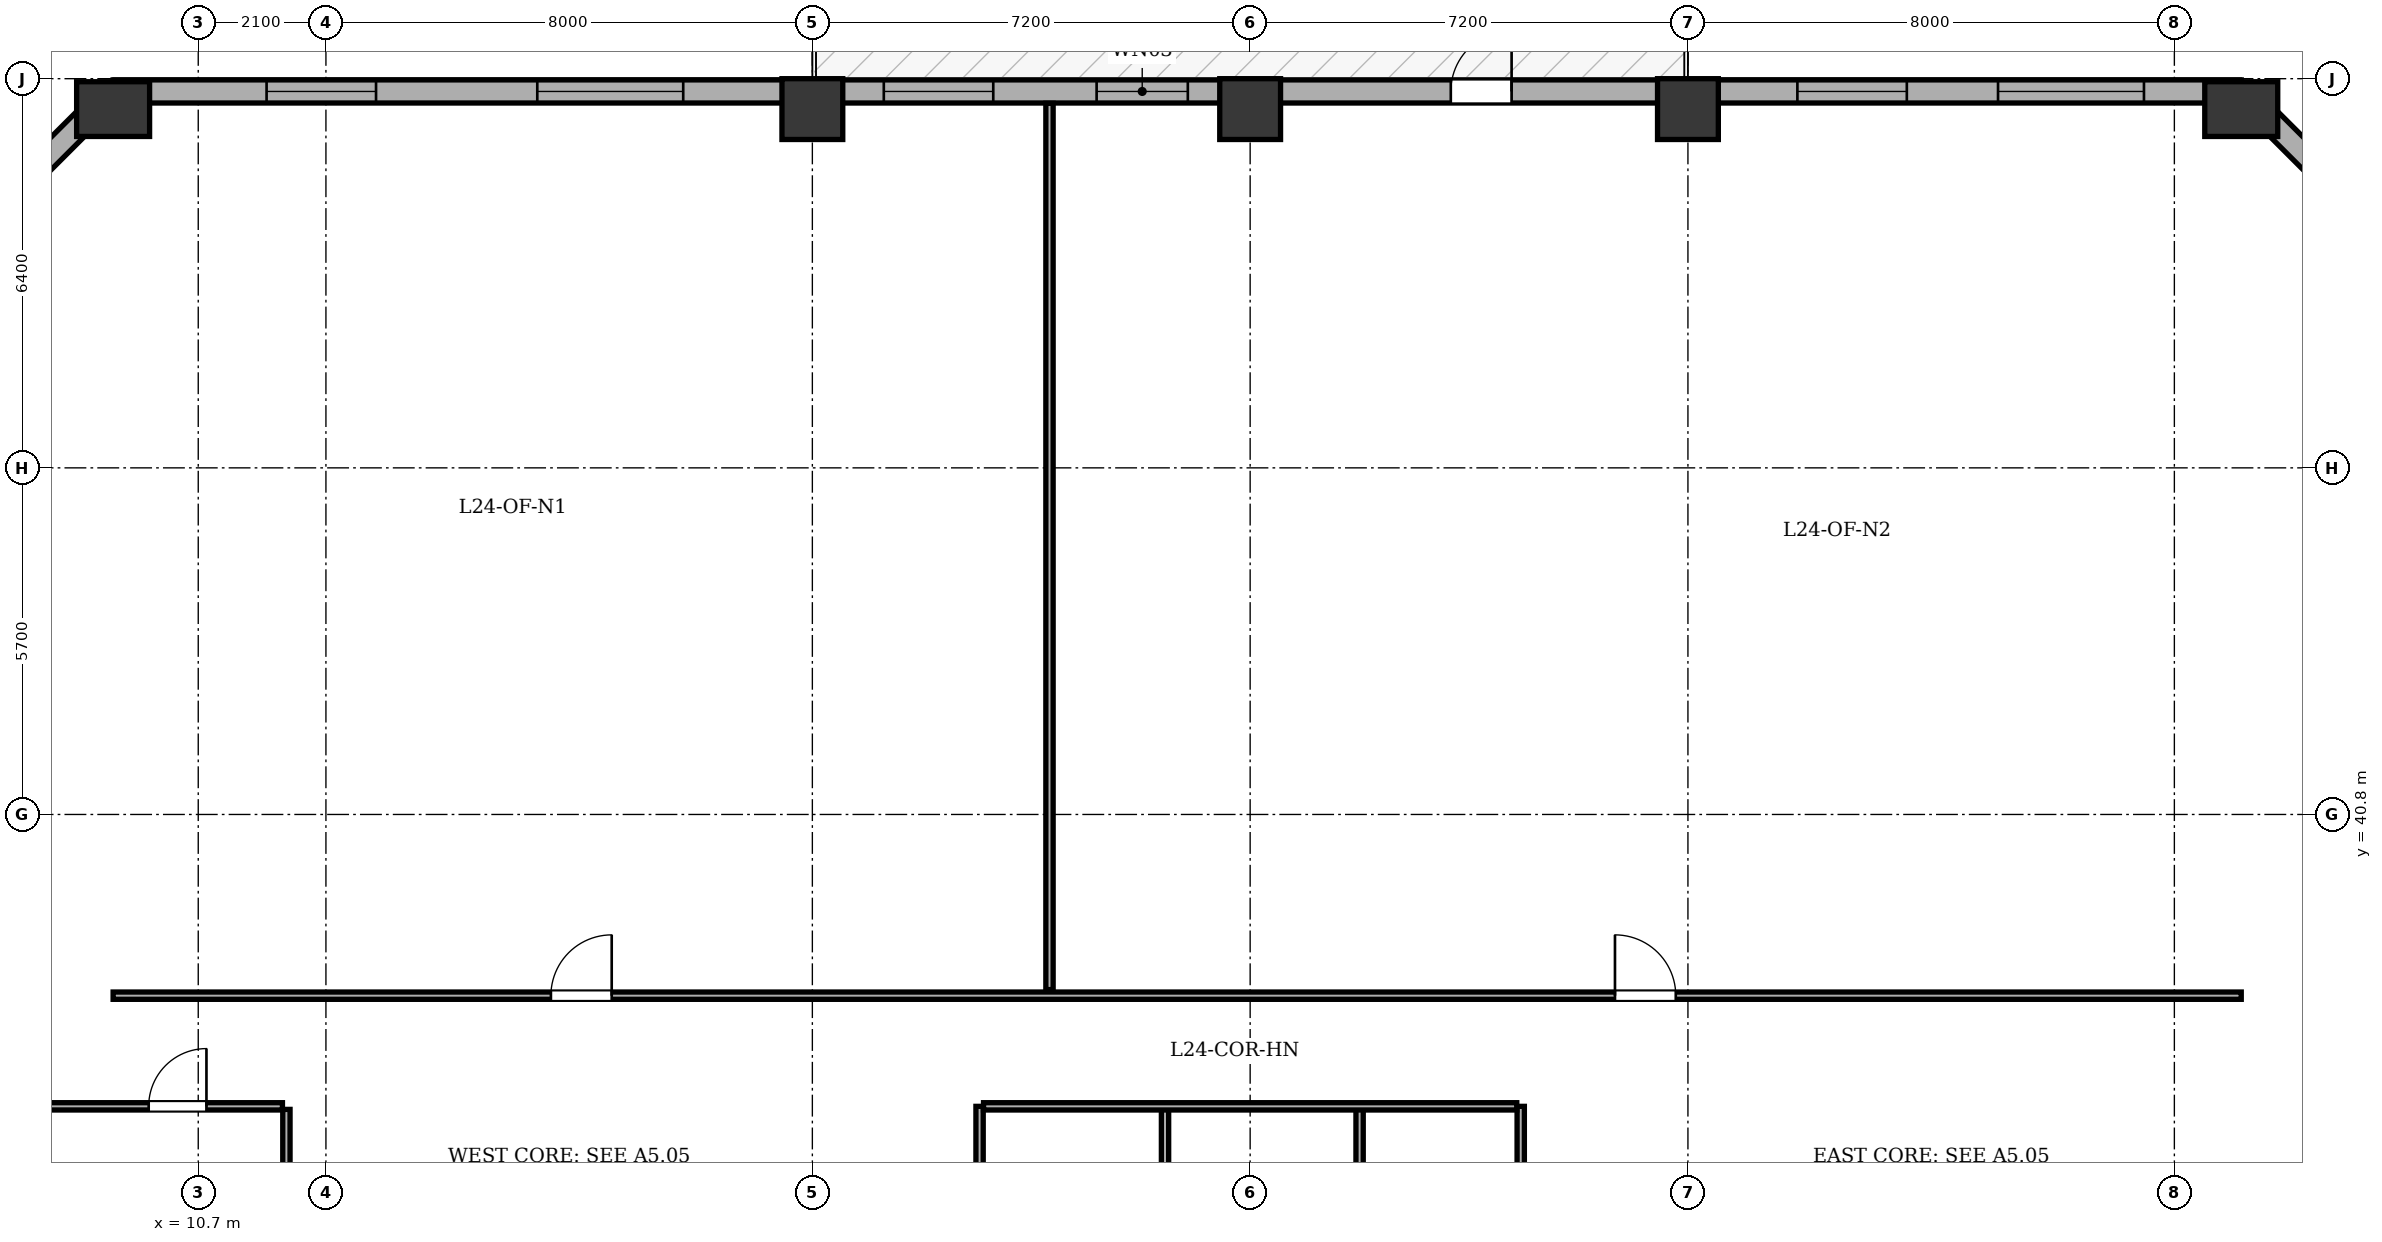
"""IFC4 building model, lengths in metres.
Left out: names, types, materials, properties, quantities, classifications, styles, units other than length and angle.
Written with IfcOpenShell. Run it as: python <this file> out.ifc"""

import sys

from ifc_helpers import new_model, si_unit, direction, frame, frame_2d, origin, origin_2d, place, context, subcontext, project, spatial, rectangle, extrude, element, fill, save


model = new_model("IFC4")
c1 = context("Model", 3, precision=1e-05, world=origin(), true_north=direction((0.0, 1.0)))
c2 = subcontext(c1, "Body", "Model", "MODEL_VIEW")
j1 = project(units=[si_unit("LENGTHUNIT", "METRE"), si_unit("PLANEANGLEUNIT", "RADIAN")], contexts=[c1])
p1 = place(None, origin())
s1 = spatial("IfcSite", under=j1, at=p1, CompositionType="ELEMENT")
p2 = place(p1, origin())
s2 = spatial("IfcBuilding", under=s1, at=p2, CompositionType="ELEMENT")
p3 = place(p2, frame((0.0, 0.0, 98.4)))
s3 = spatial("IfcBuildingStorey", under=s2, at=p3, CompositionType="ELEMENT", Elevation=98.4)
p4 = place(p3, frame((9.3, 52.4, 0.0), z_axis=(0.0, 0.0, 1.0), x_axis=(1.0, 0.0, 0.0)))
e1 = element("IfcColumn", 1, at=p4, inside=s3, PredefinedType="COLUMN", context=c2, shape_type="SweptSolid", body=[
    extrude(rectangle(XDim=0.9, YDim=1.2, at=origin_2d()), origin(), (0.0, 0.0, 1.0), 3.9),
])
for number, where, z_axis, x_axis in (
    (2, (20.8, 52.4, 0.0), (0.0, 0.0, 1.0), (1.0, 0.0, 0.0)),
    (3, (28.0, 52.4, 0.0), (0.0, 0.0, 1.0), (1.0, 0.0, 0.0)),
    (4, (35.2, 52.4, 0.0), (0.0, 0.0, 1.0), (1.0, 0.0, 0.0)),
):
    element("IfcColumn", number, at=place(p3, frame(where, z_axis=z_axis, x_axis=x_axis)), inside=s3, PredefinedType="COLUMN", context=c2, shape_type="SweptSolid", body=[
        extrude(rectangle(XDim=1.0, YDim=1.0, at=origin_2d()), origin(), (0.0, 0.0, 1.0), 3.9),
    ])
p5 = place(p3, frame((44.3, 52.4, 0.0), z_axis=(0.0, 0.0, 1.0), x_axis=(1.0, 0.0, 0.0)))
e5 = element("IfcColumn", 5, at=p5, inside=s3, PredefinedType="COLUMN", context=c2, shape_type="SweptSolid", body=[
    extrude(rectangle(XDim=0.9, YDim=1.2, at=origin_2d()), origin(), (0.0, 0.0, 1.0), 3.9),
])
p6 = place(p3, frame((4.51, 47.9, 0.0), z_axis=(0.0, 0.0, 1.0), x_axis=(0.707106781187, 0.707106781187, 0.0)))
e6 = element("IfcWall", 6, at=p6, inside=s3, PredefinedType="STANDARD", context=c2, shape_type="SweptSolid", body=[
    extrude(rectangle(XDim=6.774, YDim=0.38, at=frame_2d((3.387, 0.0))), origin(), (0.0, 0.0, 1.0), 3.135),
])
p7 = place(p6, frame((2.687, 0.0, 0.8)))
e7 = element("IfcOpeningElement", 7, at=p7, cuts=e6, PredefinedType="OPENING", context=c2, shape_type="SweptSolid", body=[
    extrude(rectangle(XDim=1.4, YDim=1.65, at=frame_2d((0.7, 0.825))), frame((0.0, 0.2, 0.0), z_axis=(0.0, -1.0, 0.0), x_axis=(1.0, 0.0, 0.0)), (0.0, 0.0, 1.0), 0.4),
])
p8 = place(p3, frame((9.3, 52.69, 0.0), z_axis=(0.0, 0.0, 1.0), x_axis=(1.0, 0.0, 0.0)))
e8 = element("IfcWall", 8, at=p8, inside=s3, PredefinedType="STANDARD", context=c2, shape_type="SweptSolid", body=[
    extrude(rectangle(XDim=35.0, YDim=0.38, at=frame_2d((17.5, 0.0))), origin(), (0.0, 0.0, 1.0), 3.135),
])
p9 = place(p8, frame((22.0, 0.0, 0.0)))
e9 = element("IfcOpeningElement", 9, at=p9, cuts=e8, PredefinedType="OPENING", context=c2, shape_type="SweptSolid", body=[
    extrude(rectangle(XDim=1.0, YDim=2.02, at=frame_2d((0.5, 1.01))), frame((0.0, 0.2, 0.0), z_axis=(0.0, -1.0, 0.0), x_axis=(1.0, 0.0, 0.0)), (0.0, 0.0, 1.0), 0.4),
])
p10 = place(p8, frame((2.524, 0.0, 0.8)))
e10 = element("IfcOpeningElement", 10, at=p10, cuts=e8, PredefinedType="OPENING", context=c2, shape_type="SweptSolid", body=[
    extrude(rectangle(XDim=1.8, YDim=1.9, at=frame_2d((0.9, 0.95))), frame((0.0, 0.2, 0.0), z_axis=(0.0, -1.0, 0.0), x_axis=(1.0, 0.0, 0.0)), (0.0, 0.0, 1.0), 0.4),
])
p11 = place(p8, frame((6.976, 0.0, 0.8)))
e11 = element("IfcOpeningElement", 11, at=p11, cuts=e8, PredefinedType="OPENING", context=c2, shape_type="SweptSolid", body=[
    extrude(rectangle(XDim=2.4, YDim=1.9, at=frame_2d((1.2, 0.95))), frame((0.0, 0.2, 0.0), z_axis=(0.0, -1.0, 0.0), x_axis=(1.0, 0.0, 0.0)), (0.0, 0.0, 1.0), 0.4),
])
p12 = place(p8, frame((12.675, 0.0, 0.8)))
e12 = element("IfcOpeningElement", 12, at=p12, cuts=e8, PredefinedType="OPENING", context=c2, shape_type="SweptSolid", body=[
    extrude(rectangle(XDim=1.8, YDim=1.9, at=frame_2d((0.9, 0.95))), frame((0.0, 0.2, 0.0), z_axis=(0.0, -1.0, 0.0), x_axis=(1.0, 0.0, 0.0)), (0.0, 0.0, 1.0), 0.4),
])
p13 = place(p8, frame((16.175, 0.0, 0.8)))
e13 = element("IfcOpeningElement", 13, at=p13, cuts=e8, PredefinedType="OPENING", context=c2, shape_type="SweptSolid", body=[
    extrude(rectangle(XDim=1.5, YDim=1.9, at=frame_2d((0.75, 0.95))), frame((0.0, 0.2, 0.0), z_axis=(0.0, -1.0, 0.0), x_axis=(1.0, 0.0, 0.0)), (0.0, 0.0, 1.0), 0.4),
])
p14 = place(p8, frame((27.7, 0.0, 0.8)))
e14 = element("IfcOpeningElement", 14, at=p14, cuts=e8, PredefinedType="OPENING", context=c2, shape_type="SweptSolid", body=[
    extrude(rectangle(XDim=1.8, YDim=1.9, at=frame_2d((0.9, 0.95))), frame((0.0, 0.2, 0.0), z_axis=(0.0, -1.0, 0.0), x_axis=(1.0, 0.0, 0.0)), (0.0, 0.0, 1.0), 0.4),
])
p15 = place(p8, frame((31.0, 0.0, 0.8)))
e15 = element("IfcOpeningElement", 15, at=p15, cuts=e8, PredefinedType="OPENING", context=c2, shape_type="SweptSolid", body=[
    extrude(rectangle(XDim=2.4, YDim=1.9, at=frame_2d((1.2, 0.95))), frame((0.0, 0.2, 0.0), z_axis=(0.0, -1.0, 0.0), x_axis=(1.0, 0.0, 0.0)), (0.0, 0.0, 1.0), 0.4),
])
p16 = place(p3, frame((44.3, 52.69, 0.0), z_axis=(0.0, 0.0, 1.0), x_axis=(0.707106781187, -0.707106781187, 0.0)))
e16 = element("IfcWall", 16, at=p16, inside=s3, PredefinedType="STANDARD", context=c2, shape_type="SweptSolid", body=[
    extrude(rectangle(XDim=6.774, YDim=0.38, at=frame_2d((3.387, 0.0))), origin(), (0.0, 0.0, 1.0), 3.135),
])
p17 = place(p16, frame((2.687, 0.0, 0.8)))
e17 = element("IfcOpeningElement", 17, at=p17, cuts=e16, PredefinedType="OPENING", context=c2, shape_type="SweptSolid", body=[
    extrude(rectangle(XDim=1.4, YDim=1.65, at=frame_2d((0.7, 0.825))), frame((0.0, 0.2, 0.0), z_axis=(0.0, -1.0, 0.0), x_axis=(1.0, 0.0, 0.0)), (0.0, 0.0, 1.0), 0.4),
])
for number, where, z_axis, x_axis in (
    (18, (23.55, 24.715, 0.0), (0.0, 0.0, 1.0), (0.0, 1.0, 0.0)),
    (19, (32.45, 24.715, 0.0), (0.0, 0.0, 1.0), (0.0, 1.0, 0.0)),
    (20, (26.6, 24.715, 0.0), (0.0, 0.0, 1.0), (0.0, 1.0, 0.0)),
):
    element("IfcWall", number, at=place(p3, frame(where, z_axis=z_axis, x_axis=x_axis)), inside=s3, PredefinedType="PARTITIONING", context=c2, shape_type="SweptSolid", body=[
        extrude(rectangle(XDim=11.285, YDim=0.12, at=frame_2d((5.643, 0.0))), origin(), (0.0, 0.0, 1.0), 3.6),
    ])
p18 = place(p3, frame((29.8, 24.715, 0.0), z_axis=(0.0, 0.0, 1.0), x_axis=(0.0, 1.0, 0.0)))
e21 = element("IfcWall", 21, at=p18, inside=s3, PredefinedType="PARTITIONING", context=c2, shape_type="SweptSolid", body=[
    extrude(rectangle(XDim=11.285, YDim=0.12, at=frame_2d((5.643, 0.0))), origin(), (0.0, 0.0, 1.0), 3.135),
])
p19 = place(p3, frame((23.615, 36.0, 0.0), z_axis=(0.0, 0.0, 1.0), x_axis=(1.0, 0.0, 0.0)))
e22 = element("IfcWall", 22, at=p19, inside=s3, PredefinedType="PARTITIONING", context=c2, shape_type="SweptSolid", body=[
    extrude(rectangle(XDim=8.77, YDim=0.12, at=frame_2d((4.385, 0.0))), origin(), (0.0, 0.0, 1.0), 3.6),
])
p20 = place(p3, frame((9.3, 37.82, 0.0), z_axis=(0.0, 0.0, 1.0), x_axis=(1.0, 0.0, 0.0)))
e23 = element("IfcWall", 23, at=p20, inside=s3, PredefinedType="PARTITIONING", context=c2, shape_type="SweptSolid", body=[
    extrude(rectangle(XDim=35.0, YDim=0.12, at=frame_2d((17.5, 0.0))), origin(), (0.0, 0.0, 1.0), 3.6),
])
p21 = place(p20, frame((7.2, 0.0, 0.0)))
e24 = element("IfcOpeningElement", 24, at=p21, cuts=e23, PredefinedType="OPENING", context=c2, shape_type="SweptSolid", body=[
    extrude(rectangle(XDim=1.0, YDim=2.1, at=frame_2d((0.5, 1.05))), frame((0.0, 0.07, 0.0), z_axis=(0.0, -1.0, 0.0), x_axis=(1.0, 0.0, 0.0)), (0.0, 0.0, 1.0), 0.14),
])
p22 = place(p20, frame((24.7, 0.0, 0.0)))
e25 = element("IfcOpeningElement", 25, at=p22, cuts=e23, PredefinedType="OPENING", context=c2, shape_type="SweptSolid", body=[
    extrude(rectangle(XDim=1.0, YDim=2.1, at=frame_2d((0.5, 1.05))), frame((0.0, 0.07, 0.0), z_axis=(0.0, -1.0, 0.0), x_axis=(1.0, 0.0, 0.0)), (0.0, 0.0, 1.0), 0.14),
])
p23 = place(p3, frame((24.7, 37.92, 0.0), z_axis=(0.0, 0.0, 1.0), x_axis=(0.0, 1.0, 0.0)))
e26 = element("IfcWall", 26, at=p23, inside=s3, PredefinedType="PARTITIONING", context=c2, shape_type="SweptSolid", body=[
    extrude(rectangle(XDim=14.575, YDim=0.12, at=frame_2d((7.288, 0.0))), origin(), (0.0, 0.0, 1.0), 3.6),
])
p24 = place(p3, frame((12.15, 18.45, 0.0), z_axis=(0.0, 0.0, 1.0), x_axis=(0.0, 1.0, 0.0)))
e27 = element("IfcWall", 27, at=p24, inside=s3, PredefinedType="PARTITIONING", context=c2, shape_type="SweptSolid", body=[
    extrude(rectangle(XDim=17.5, YDim=0.12, at=frame_2d((8.75, 0.0))), origin(), (0.0, 0.0, 1.0), 3.6),
])
p25 = place(p3, frame((4.705, 36.0, 0.0), z_axis=(0.0, 0.0, 1.0), x_axis=(1.0, 0.0, 0.0)))
e28 = element("IfcWall", 28, at=p25, inside=s3, PredefinedType="PARTITIONING", context=c2, shape_type="SweptSolid", body=[
    extrude(rectangle(XDim=7.38, YDim=0.12, at=frame_2d((3.69, 0.0))), origin(), (0.0, 0.0, 1.0), 3.6),
])
p26 = place(p25, frame((5.18, 0.0, 0.0)))
e29 = element("IfcOpeningElement", 29, at=p26, cuts=e28, PredefinedType="OPENING", context=c2, shape_type="SweptSolid", body=[
    extrude(rectangle(XDim=0.95, YDim=2.1, at=frame_2d((0.475, 1.05))), frame((0.0, 0.07, 0.0), z_axis=(0.0, -1.0, 0.0), x_axis=(1.0, 0.0, 0.0)), (0.0, 0.0, 1.0), 0.14),
])
p27 = place(p9, origin())
e30 = element("IfcDoor", 30, at=p27, inside=s3, OperationType="SINGLE_SWING_RIGHT", PredefinedType="DOOR", context=c2, shape_type="SweptSolid", body=[
    extrude(rectangle(XDim=1.0, YDim=2.02, at=frame_2d((0.5, 1.01))), frame((0.0, 0.025, 0.0), z_axis=(0.0, -1.0, 0.0), x_axis=(1.0, 0.0, 0.0)), (0.0, 0.0, 1.0), 0.05),
])
fill(e9, e30)
p28 = place(p10, origin())
e31 = element("IfcWindow", 31, at=p28, inside=s3, PartitioningType="SINGLE_PANEL", PredefinedType="WINDOW", context=c2, shape_type="SweptSolid", body=[
    extrude(rectangle(XDim=1.8, YDim=1.9, at=frame_2d((0.9, 0.95))), frame((0.0, -0.01, 0.0), z_axis=(0.0, -1.0, 0.0), x_axis=(1.0, 0.0, 0.0)), (0.0, 0.0, 1.0), 0.06),
])
fill(e10, e31)
p29 = place(p11, origin())
e32 = element("IfcWindow", 32, at=p29, inside=s3, PartitioningType="SINGLE_PANEL", PredefinedType="WINDOW", context=c2, shape_type="SweptSolid", body=[
    extrude(rectangle(XDim=2.4, YDim=1.9, at=frame_2d((1.2, 0.95))), frame((0.0, -0.01, 0.0), z_axis=(0.0, -1.0, 0.0), x_axis=(1.0, 0.0, 0.0)), (0.0, 0.0, 1.0), 0.06),
])
fill(e11, e32)
p30 = place(p12, origin())
e33 = element("IfcWindow", 33, at=p30, inside=s3, PartitioningType="SINGLE_PANEL", PredefinedType="WINDOW", context=c2, shape_type="SweptSolid", body=[
    extrude(rectangle(XDim=1.8, YDim=1.9, at=frame_2d((0.9, 0.95))), frame((0.0, -0.01, 0.0), z_axis=(0.0, -1.0, 0.0), x_axis=(1.0, 0.0, 0.0)), (0.0, 0.0, 1.0), 0.06),
])
fill(e12, e33)
p31 = place(p13, origin())
e34 = element("IfcWindow", 34, at=p31, inside=s3, PartitioningType="SINGLE_PANEL", PredefinedType="WINDOW", context=c2, shape_type="SweptSolid", body=[
    extrude(rectangle(XDim=1.5, YDim=1.9, at=frame_2d((0.75, 0.95))), frame((0.0, -0.01, 0.0), z_axis=(0.0, -1.0, 0.0), x_axis=(1.0, 0.0, 0.0)), (0.0, 0.0, 1.0), 0.06),
])
fill(e13, e34)
p32 = place(p14, origin())
e35 = element("IfcWindow", 35, at=p32, inside=s3, PartitioningType="SINGLE_PANEL", PredefinedType="WINDOW", context=c2, shape_type="SweptSolid", body=[
    extrude(rectangle(XDim=1.8, YDim=1.9, at=frame_2d((0.9, 0.95))), frame((0.0, -0.01, 0.0), z_axis=(0.0, -1.0, 0.0), x_axis=(1.0, 0.0, 0.0)), (0.0, 0.0, 1.0), 0.06),
])
fill(e14, e35)
p33 = place(p15, origin())
e36 = element("IfcWindow", 36, at=p33, inside=s3, PartitioningType="SINGLE_PANEL", PredefinedType="WINDOW", context=c2, shape_type="SweptSolid", body=[
    extrude(rectangle(XDim=2.4, YDim=1.9, at=frame_2d((1.2, 0.95))), frame((0.0, -0.01, 0.0), z_axis=(0.0, -1.0, 0.0), x_axis=(1.0, 0.0, 0.0)), (0.0, 0.0, 1.0), 0.06),
])
fill(e15, e36)
p34 = place(p21, origin())
e37 = element("IfcDoor", 37, at=p34, inside=s3, OperationType="SINGLE_SWING_RIGHT", PredefinedType="DOOR", context=c2, shape_type="SweptSolid", body=[
    extrude(rectangle(XDim=1.0, YDim=2.1, at=frame_2d((0.5, 1.05))), frame((0.0, 0.025, 0.0), z_axis=(0.0, -1.0, 0.0), x_axis=(1.0, 0.0, 0.0)), (0.0, 0.0, 1.0), 0.05),
])
fill(e24, e37)
p35 = place(p22, origin())
e38 = element("IfcDoor", 38, at=p35, inside=s3, OperationType="SINGLE_SWING_LEFT", PredefinedType="DOOR", context=c2, shape_type="SweptSolid", body=[
    extrude(rectangle(XDim=1.0, YDim=2.1, at=frame_2d((0.5, 1.05))), frame((0.0, 0.025, 0.0), z_axis=(0.0, -1.0, 0.0), x_axis=(1.0, 0.0, 0.0)), (0.0, 0.0, 1.0), 0.05),
])
fill(e25, e38)
p36 = place(p26, origin())
e39 = element("IfcDoor", 39, at=p36, inside=s3, OperationType="SINGLE_SWING_RIGHT", PredefinedType="DOOR", context=c2, shape_type="SweptSolid", body=[
    extrude(rectangle(XDim=0.95, YDim=2.1, at=frame_2d((0.475, 1.05))), frame((0.0, 0.025, 0.0), z_axis=(0.0, -1.0, 0.0), x_axis=(1.0, 0.0, 0.0)), (0.0, 0.0, 1.0), 0.05),
])
fill(e29, e39)
save(model, sys.argv[1])
